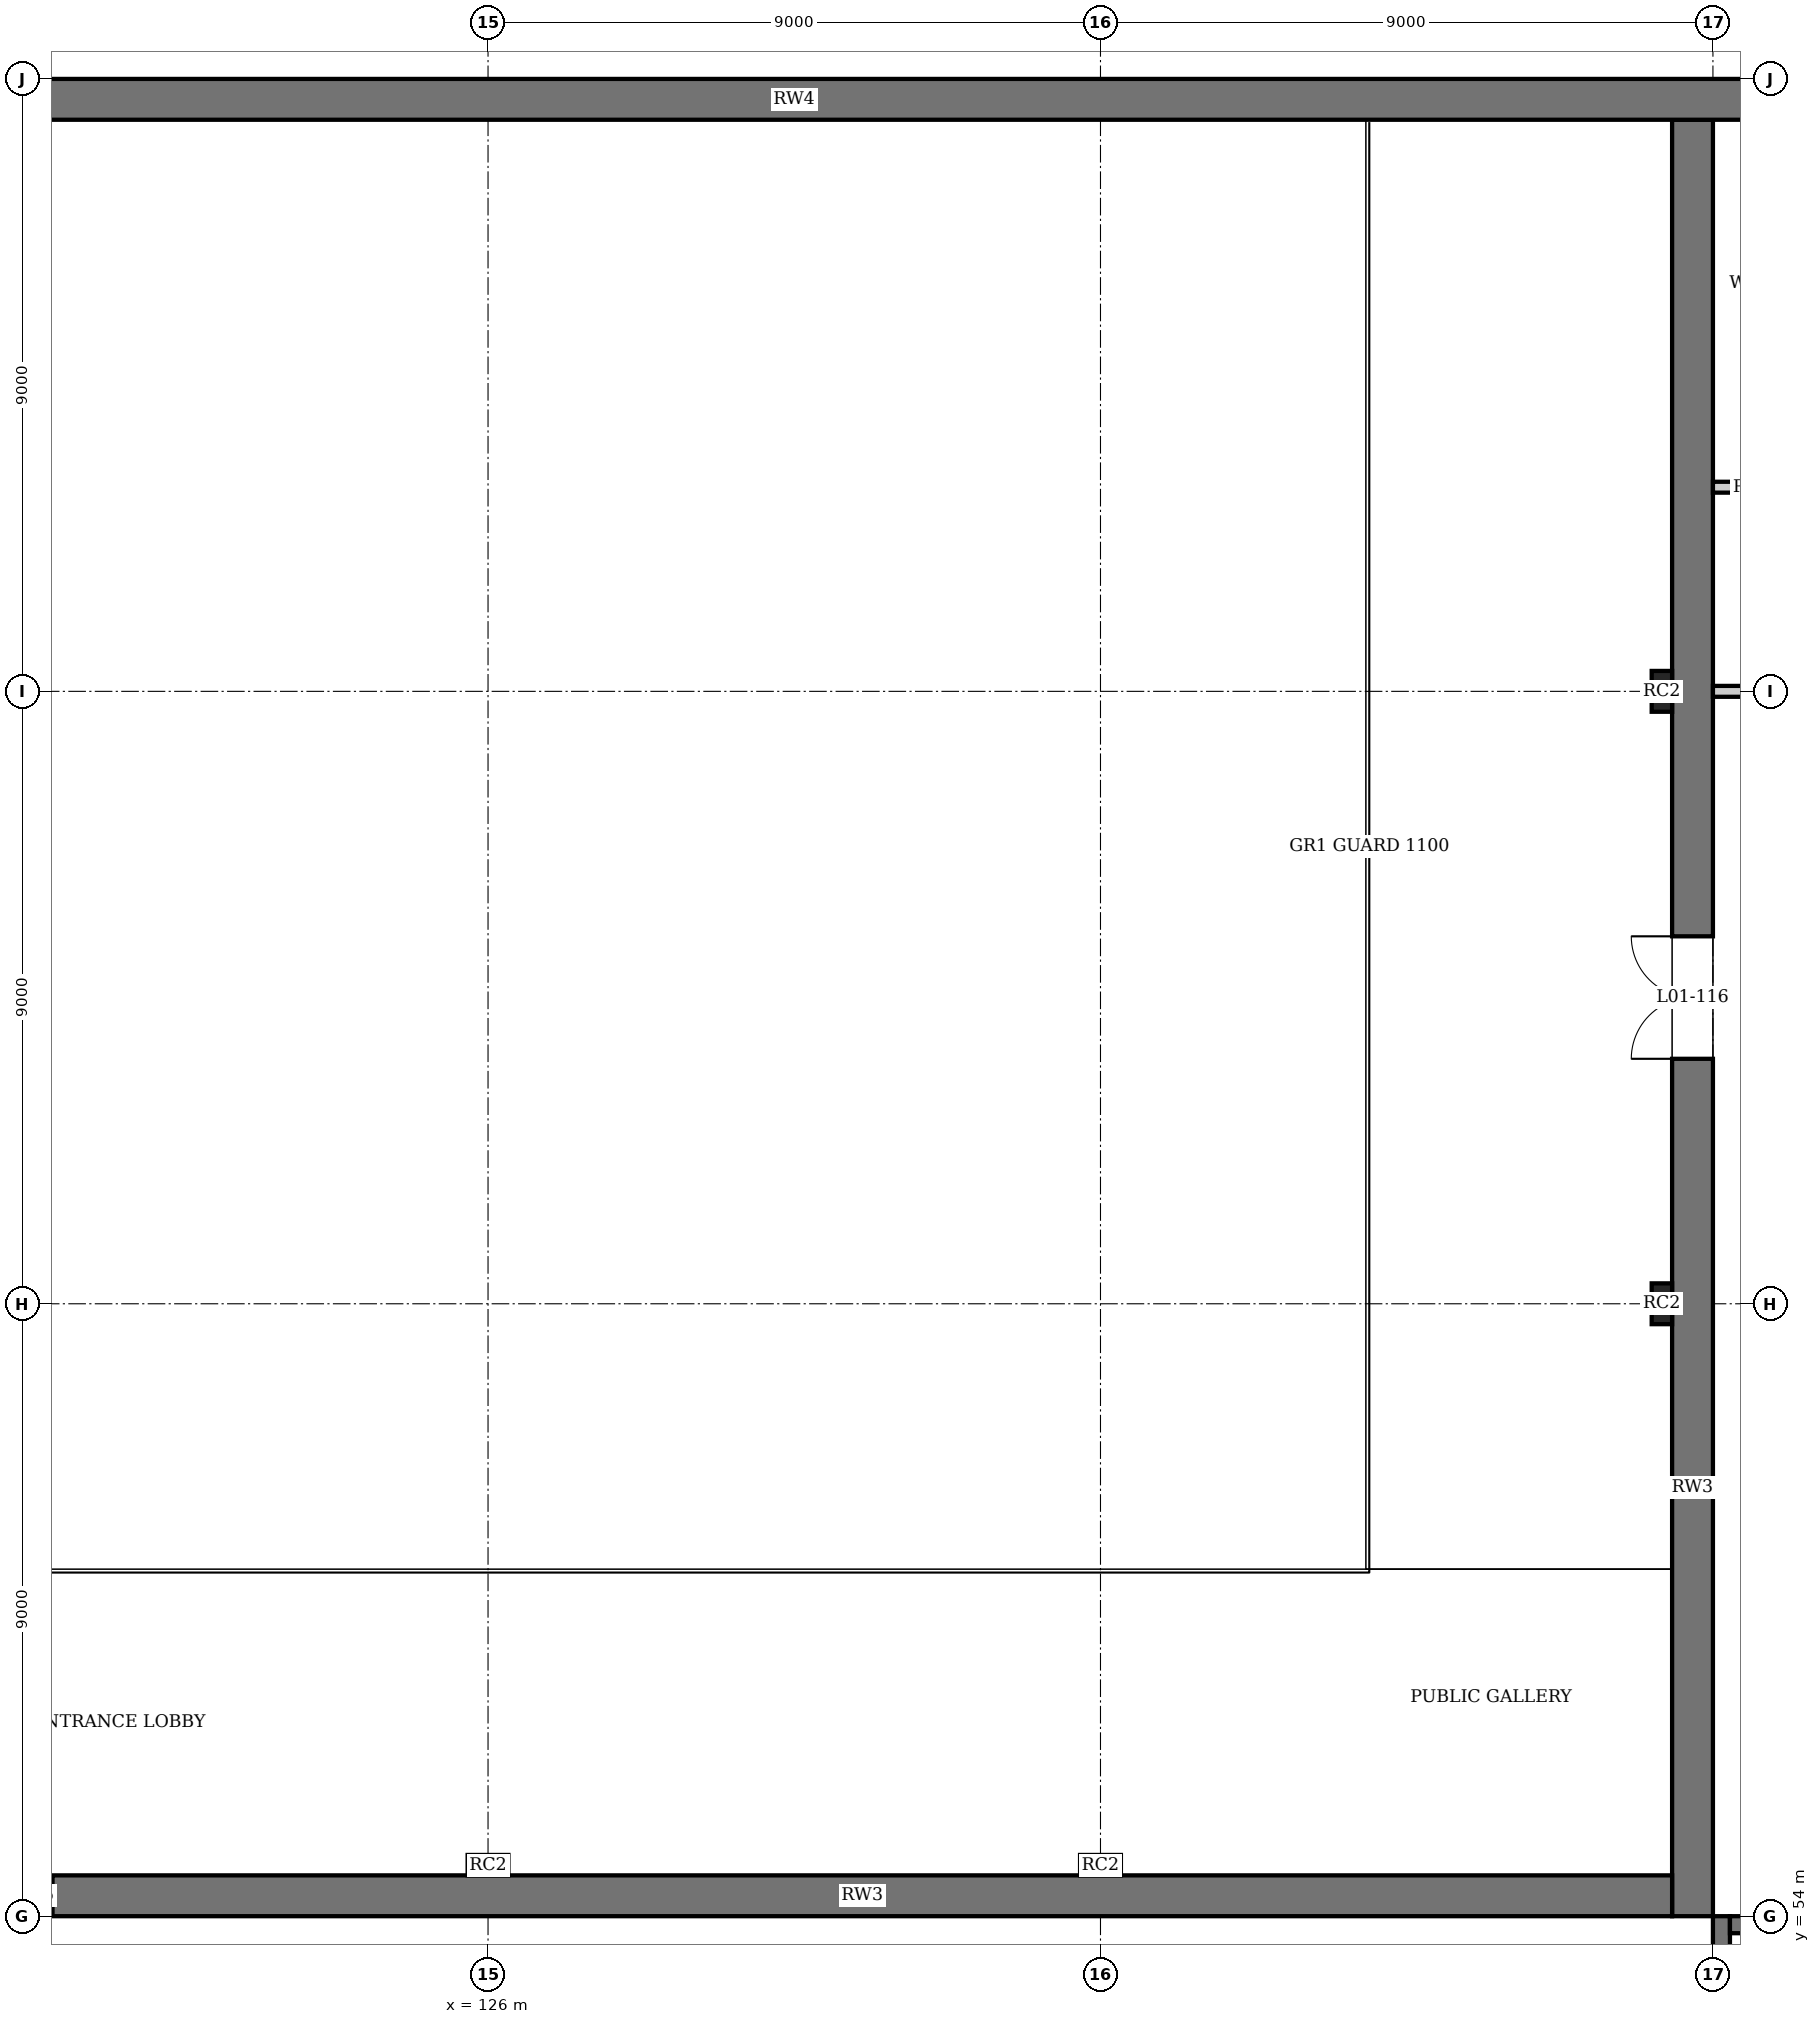
"""IFC4 building model, lengths in metres.
Left out: names, types, materials, properties, quantities, classifications, styles, units other than length and angle.
Written with IfcOpenShell. Run it as: python <this file> out.ifc"""

import sys

from ifc_helpers import new_model, si_unit, direction, frame, frame_2d, origin, origin_2d, place, context, subcontext, project, spatial, rectangle, extrude, element, fill, save


model = new_model("IFC4")
c1 = context("Model", 3, precision=1e-05, world=origin(), true_north=direction((0.0, 1.0)))
c2 = subcontext(c1, "Body", "Model", "MODEL_VIEW")
j1 = project(units=[si_unit("LENGTHUNIT", "METRE"), si_unit("PLANEANGLEUNIT", "RADIAN")], contexts=[c1])
p1 = place(None, origin())
s1 = spatial("IfcSite", under=j1, at=p1, CompositionType="ELEMENT")
p2 = place(p1, origin())
s2 = spatial("IfcBuilding", under=s1, at=p2, CompositionType="ELEMENT")
p3 = place(p2, frame((0.0, 0.0, 6.0)))
s3 = spatial("IfcBuildingStorey", under=s2, at=p3, CompositionType="ELEMENT", Elevation=6.0)
p4 = place(p3, frame((144.125, 45.0, 0.0), z_axis=(0.0, 0.0, 1.0), x_axis=(0.0, 1.0, 0.0)))
e1 = element("IfcWall", 1, at=p4, inside=s3, PredefinedType="SHEAR", context=c2, shape_type="SweptSolid", body=[
    extrude(rectangle(XDim=9.0, YDim=0.25, at=frame_2d((4.5, 0.0))), origin(), (0.0, 0.0, 1.0), 4.5),
])
p5 = place(p3, frame((144.25, 53.875, 0.0), z_axis=(0.0, 0.0, 1.0), x_axis=(1.0, 0.0, 0.0)))
e2 = element("IfcWall", 2, at=p5, inside=s3, PredefinedType="SHEAR", context=c2, shape_type="SweptSolid", body=[
    extrude(rectangle(XDim=8.5, YDim=0.25, at=frame_2d((4.25, 0.0))), origin(), (0.0, 0.0, 1.0), 4.5),
])
p6 = place(p5, frame((6.95, 0.0, 0.0)))
e3 = element("IfcOpeningElement", 3, at=p6, cuts=e2, PredefinedType="OPENING", context=c2, shape_type="SweptSolid", body=[
    extrude(rectangle(XDim=1.0, YDim=2.1, at=frame_2d((0.5, 1.05))), frame((0.0, 0.135, 0.0), z_axis=(0.0, -1.0, 0.0), x_axis=(1.0, 0.0, 0.0)), (0.0, 0.0, 1.0), 0.27),
])
p7 = place(p3, frame((143.7, 54.0, 0.0), z_axis=(0.0, 0.0, 1.0), x_axis=(0.0, 1.0, 0.0)))
e4 = element("IfcWall", 4, at=p7, inside=s3, PredefinedType="SHEAR", context=c2, shape_type="SweptSolid", body=[
    extrude(rectangle(XDim=26.4, YDim=0.6, at=frame_2d((13.2, 0.0))), origin(), (0.0, 0.0, 1.0), 4.5),
])
p8 = place(p7, frame((12.6, 0.0, 0.0)))
e5 = element("IfcOpeningElement", 5, at=p8, cuts=e4, PredefinedType="OPENING", context=c2, shape_type="SweptSolid", body=[
    extrude(rectangle(XDim=1.8, YDim=2.1, at=frame_2d((0.9, 1.05))), frame((0.0, 0.31, 0.0), z_axis=(0.0, -1.0, 0.0), x_axis=(1.0, 0.0, 0.0)), (0.0, 0.0, 1.0), 0.62),
])
p9 = place(p3, frame((117.6, 54.3, 0.0), z_axis=(0.0, 0.0, 1.0), x_axis=(1.0, 0.0, 0.0)))
e6 = element("IfcWall", 6, at=p9, inside=s3, PredefinedType="SHEAR", context=c2, shape_type="SweptSolid", body=[
    extrude(rectangle(XDim=25.8, YDim=0.6, at=frame_2d((12.9, 0.0))), origin(), (0.0, 0.0, 1.0), 4.5),
])
p10 = place(p9, frame((1.0, 0.0, 0.0)))
e7 = element("IfcOpeningElement", 7, at=p10, cuts=e6, PredefinedType="OPENING", context=c2, shape_type="SweptSolid", body=[
    extrude(rectangle(XDim=1.0, YDim=2.1, at=frame_2d((0.5, 1.05))), frame((0.0, 0.31, 0.0), z_axis=(0.0, -1.0, 0.0), x_axis=(1.0, 0.0, 0.0)), (0.0, 0.0, 1.0), 0.62),
])
for number, where, z_axis, x_axis in (
    (8, (126.0, 54.75, 0.0), (0.0, 0.0, 1.0), (1.0, 0.0, 0.0)),
    (9, (135.0, 54.75, 0.0), (0.0, 0.0, 1.0), (1.0, 0.0, 0.0)),
    (10, (143.25, 63.0, 0.0), (0.0, 0.0, 1.0), (0.0, 1.0, 0.0)),
    (11, (143.25, 72.0, 0.0), (0.0, 0.0, 1.0), (0.0, 1.0, 0.0)),
):
    element("IfcColumn", number, at=place(p3, frame(where, z_axis=z_axis, x_axis=x_axis)), inside=s3, PredefinedType="PILASTER", context=c2, shape_type="SweptSolid", body=[
        extrude(rectangle(XDim=0.6, YDim=0.3, at=origin_2d()), origin(), (0.0, 0.0, 1.0), 4.5),
    ])
p11 = place(p3, frame((0.0, 80.7, 0.0), z_axis=(0.0, 0.0, 1.0), x_axis=(1.0, 0.0, 0.0)))
e12 = element("IfcWall", 12, at=p11, inside=s3, PredefinedType="SHEAR", context=c2, shape_type="SweptSolid", body=[
    extrude(rectangle(XDim=180.0, YDim=0.6, at=frame_2d((90.0, 0.0))), origin(), (0.0, 0.0, 1.0), 4.5),
])
p12 = place(p11, frame((0.9, 0.0, 0.6)))
e13 = element("IfcOpeningElement", 13, at=p12, cuts=e12, PredefinedType="OPENING", context=c2, shape_type="SweptSolid", body=[
    extrude(rectangle(XDim=2.7, YDim=2.7, at=frame_2d((1.35, 1.35))), frame((0.0, 0.31, 0.0), z_axis=(0.0, -1.0, 0.0), x_axis=(1.0, 0.0, 0.0)), (0.0, 0.0, 1.0), 0.62),
])
p13 = place(p11, frame((5.4, 0.0, 0.6)))
e14 = element("IfcOpeningElement", 14, at=p13, cuts=e12, PredefinedType="OPENING", context=c2, shape_type="SweptSolid", body=[
    extrude(rectangle(XDim=2.7, YDim=2.7, at=frame_2d((1.35, 1.35))), frame((0.0, 0.31, 0.0), z_axis=(0.0, -1.0, 0.0), x_axis=(1.0, 0.0, 0.0)), (0.0, 0.0, 1.0), 0.62),
])
p14 = place(p11, frame((9.9, 0.0, 0.6)))
e15 = element("IfcOpeningElement", 15, at=p14, cuts=e12, PredefinedType="OPENING", context=c2, shape_type="SweptSolid", body=[
    extrude(rectangle(XDim=2.7, YDim=2.7, at=frame_2d((1.35, 1.35))), frame((0.0, 0.31, 0.0), z_axis=(0.0, -1.0, 0.0), x_axis=(1.0, 0.0, 0.0)), (0.0, 0.0, 1.0), 0.62),
])
p15 = place(p11, frame((14.4, 0.0, 0.6)))
e16 = element("IfcOpeningElement", 16, at=p15, cuts=e12, PredefinedType="OPENING", context=c2, shape_type="SweptSolid", body=[
    extrude(rectangle(XDim=2.7, YDim=2.7, at=frame_2d((1.35, 1.35))), frame((0.0, 0.31, 0.0), z_axis=(0.0, -1.0, 0.0), x_axis=(1.0, 0.0, 0.0)), (0.0, 0.0, 1.0), 0.62),
])
p16 = place(p11, frame((18.9, 0.0, 0.6)))
e17 = element("IfcOpeningElement", 17, at=p16, cuts=e12, PredefinedType="OPENING", context=c2, shape_type="SweptSolid", body=[
    extrude(rectangle(XDim=2.7, YDim=2.7, at=frame_2d((1.35, 1.35))), frame((0.0, 0.31, 0.0), z_axis=(0.0, -1.0, 0.0), x_axis=(1.0, 0.0, 0.0)), (0.0, 0.0, 1.0), 0.62),
])
p17 = place(p11, frame((23.4, 0.0, 0.6)))
e18 = element("IfcOpeningElement", 18, at=p17, cuts=e12, PredefinedType="OPENING", context=c2, shape_type="SweptSolid", body=[
    extrude(rectangle(XDim=2.7, YDim=2.7, at=frame_2d((1.35, 1.35))), frame((0.0, 0.31, 0.0), z_axis=(0.0, -1.0, 0.0), x_axis=(1.0, 0.0, 0.0)), (0.0, 0.0, 1.0), 0.62),
])
p18 = place(p11, frame((37.05, 0.0, 0.9)))
e19 = element("IfcOpeningElement", 19, at=p18, cuts=e12, PredefinedType="OPENING", context=c2, shape_type="SweptSolid", body=[
    extrude(rectangle(XDim=2.4, YDim=2.1, at=frame_2d((1.2, 1.05))), frame((0.0, 0.31, 0.0), z_axis=(0.0, -1.0, 0.0), x_axis=(1.0, 0.0, 0.0)), (0.0, 0.0, 1.0), 0.62),
])
p19 = place(p11, frame((41.55, 0.0, 0.9)))
e20 = element("IfcOpeningElement", 20, at=p19, cuts=e12, PredefinedType="OPENING", context=c2, shape_type="SweptSolid", body=[
    extrude(rectangle(XDim=2.4, YDim=2.1, at=frame_2d((1.2, 1.05))), frame((0.0, 0.31, 0.0), z_axis=(0.0, -1.0, 0.0), x_axis=(1.0, 0.0, 0.0)), (0.0, 0.0, 1.0), 0.62),
])
p20 = place(p11, frame((46.05, 0.0, 0.9)))
e21 = element("IfcOpeningElement", 21, at=p20, cuts=e12, PredefinedType="OPENING", context=c2, shape_type="SweptSolid", body=[
    extrude(rectangle(XDim=2.4, YDim=2.1, at=frame_2d((1.2, 1.05))), frame((0.0, 0.31, 0.0), z_axis=(0.0, -1.0, 0.0), x_axis=(1.0, 0.0, 0.0)), (0.0, 0.0, 1.0), 0.62),
])
p21 = place(p11, frame((50.55, 0.0, 0.9)))
e22 = element("IfcOpeningElement", 22, at=p21, cuts=e12, PredefinedType="OPENING", context=c2, shape_type="SweptSolid", body=[
    extrude(rectangle(XDim=2.4, YDim=2.1, at=frame_2d((1.2, 1.05))), frame((0.0, 0.31, 0.0), z_axis=(0.0, -1.0, 0.0), x_axis=(1.0, 0.0, 0.0)), (0.0, 0.0, 1.0), 0.62),
])
p22 = place(p11, frame((55.05, 0.0, 0.9)))
e23 = element("IfcOpeningElement", 23, at=p22, cuts=e12, PredefinedType="OPENING", context=c2, shape_type="SweptSolid", body=[
    extrude(rectangle(XDim=2.4, YDim=2.1, at=frame_2d((1.2, 1.05))), frame((0.0, 0.31, 0.0), z_axis=(0.0, -1.0, 0.0), x_axis=(1.0, 0.0, 0.0)), (0.0, 0.0, 1.0), 0.62),
])
p23 = place(p11, frame((59.55, 0.0, 0.9)))
e24 = element("IfcOpeningElement", 24, at=p23, cuts=e12, PredefinedType="OPENING", context=c2, shape_type="SweptSolid", body=[
    extrude(rectangle(XDim=2.4, YDim=2.1, at=frame_2d((1.2, 1.05))), frame((0.0, 0.31, 0.0), z_axis=(0.0, -1.0, 0.0), x_axis=(1.0, 0.0, 0.0)), (0.0, 0.0, 1.0), 0.62),
])
p24 = place(p11, frame((64.8, 0.0, 1.7)))
e25 = element("IfcOpeningElement", 25, at=p24, cuts=e12, PredefinedType="OPENING", context=c2, shape_type="SweptSolid", body=[
    extrude(rectangle(XDim=0.9, YDim=0.6, at=frame_2d((0.45, 0.3))), frame((0.0, 0.31, 0.0), z_axis=(0.0, -1.0, 0.0), x_axis=(1.0, 0.0, 0.0)), (0.0, 0.0, 1.0), 0.62),
])
p25 = place(p11, frame((69.3, 0.0, 1.7)))
e26 = element("IfcOpeningElement", 26, at=p25, cuts=e12, PredefinedType="OPENING", context=c2, shape_type="SweptSolid", body=[
    extrude(rectangle(XDim=0.9, YDim=0.6, at=frame_2d((0.45, 0.3))), frame((0.0, 0.31, 0.0), z_axis=(0.0, -1.0, 0.0), x_axis=(1.0, 0.0, 0.0)), (0.0, 0.0, 1.0), 0.62),
])
p26 = place(p11, frame((73.8, 0.0, 1.7)))
e27 = element("IfcOpeningElement", 27, at=p26, cuts=e12, PredefinedType="OPENING", context=c2, shape_type="SweptSolid", body=[
    extrude(rectangle(XDim=0.9, YDim=0.6, at=frame_2d((0.45, 0.3))), frame((0.0, 0.31, 0.0), z_axis=(0.0, -1.0, 0.0), x_axis=(1.0, 0.0, 0.0)), (0.0, 0.0, 1.0), 0.62),
])
p27 = place(p11, frame((90.9, 0.0, 0.6)))
e28 = element("IfcOpeningElement", 28, at=p27, cuts=e12, PredefinedType="OPENING", context=c2, shape_type="SweptSolid", body=[
    extrude(rectangle(XDim=2.7, YDim=2.7, at=frame_2d((1.35, 1.35))), frame((0.0, 0.31, 0.0), z_axis=(0.0, -1.0, 0.0), x_axis=(1.0, 0.0, 0.0)), (0.0, 0.0, 1.0), 0.62),
])
p28 = place(p11, frame((95.4, 0.0, 0.6)))
e29 = element("IfcOpeningElement", 29, at=p28, cuts=e12, PredefinedType="OPENING", context=c2, shape_type="SweptSolid", body=[
    extrude(rectangle(XDim=2.7, YDim=2.7, at=frame_2d((1.35, 1.35))), frame((0.0, 0.31, 0.0), z_axis=(0.0, -1.0, 0.0), x_axis=(1.0, 0.0, 0.0)), (0.0, 0.0, 1.0), 0.62),
])
p29 = place(p11, frame((100.8, 0.0, 1.7)))
e30 = element("IfcOpeningElement", 30, at=p29, cuts=e12, PredefinedType="OPENING", context=c2, shape_type="SweptSolid", body=[
    extrude(rectangle(XDim=0.9, YDim=0.6, at=frame_2d((0.45, 0.3))), frame((0.0, 0.31, 0.0), z_axis=(0.0, -1.0, 0.0), x_axis=(1.0, 0.0, 0.0)), (0.0, 0.0, 1.0), 0.62),
])
p30 = place(p11, frame((105.3, 0.0, 1.7)))
e31 = element("IfcOpeningElement", 31, at=p30, cuts=e12, PredefinedType="OPENING", context=c2, shape_type="SweptSolid", body=[
    extrude(rectangle(XDim=0.9, YDim=0.6, at=frame_2d((0.45, 0.3))), frame((0.0, 0.31, 0.0), z_axis=(0.0, -1.0, 0.0), x_axis=(1.0, 0.0, 0.0)), (0.0, 0.0, 1.0), 0.62),
])
p31 = place(p11, frame((109.8, 0.0, 1.7)))
e32 = element("IfcOpeningElement", 32, at=p31, cuts=e12, PredefinedType="OPENING", context=c2, shape_type="SweptSolid", body=[
    extrude(rectangle(XDim=0.9, YDim=0.6, at=frame_2d((0.45, 0.3))), frame((0.0, 0.31, 0.0), z_axis=(0.0, -1.0, 0.0), x_axis=(1.0, 0.0, 0.0)), (0.0, 0.0, 1.0), 0.62),
])
p32 = place(p11, frame((154.05, 0.0, 0.9)))
e33 = element("IfcOpeningElement", 33, at=p32, cuts=e12, PredefinedType="OPENING", context=c2, shape_type="SweptSolid", body=[
    extrude(rectangle(XDim=2.4, YDim=2.1, at=frame_2d((1.2, 1.05))), frame((0.0, 0.31, 0.0), z_axis=(0.0, -1.0, 0.0), x_axis=(1.0, 0.0, 0.0)), (0.0, 0.0, 1.0), 0.62),
])
p33 = place(p11, frame((158.55, 0.0, 0.9)))
e34 = element("IfcOpeningElement", 34, at=p33, cuts=e12, PredefinedType="OPENING", context=c2, shape_type="SweptSolid", body=[
    extrude(rectangle(XDim=2.4, YDim=2.1, at=frame_2d((1.2, 1.05))), frame((0.0, 0.31, 0.0), z_axis=(0.0, -1.0, 0.0), x_axis=(1.0, 0.0, 0.0)), (0.0, 0.0, 1.0), 0.62),
])
p34 = place(p11, frame((163.8, 0.0, 1.7)))
e35 = element("IfcOpeningElement", 35, at=p34, cuts=e12, PredefinedType="OPENING", context=c2, shape_type="SweptSolid", body=[
    extrude(rectangle(XDim=0.9, YDim=0.6, at=frame_2d((0.45, 0.3))), frame((0.0, 0.31, 0.0), z_axis=(0.0, -1.0, 0.0), x_axis=(1.0, 0.0, 0.0)), (0.0, 0.0, 1.0), 0.62),
])
p35 = place(p11, frame((168.3, 0.0, 1.7)))
e36 = element("IfcOpeningElement", 36, at=p35, cuts=e12, PredefinedType="OPENING", context=c2, shape_type="SweptSolid", body=[
    extrude(rectangle(XDim=0.9, YDim=0.6, at=frame_2d((0.45, 0.3))), frame((0.0, 0.31, 0.0), z_axis=(0.0, -1.0, 0.0), x_axis=(1.0, 0.0, 0.0)), (0.0, 0.0, 1.0), 0.62),
])
p36 = place(p11, frame((71.55, 0.0, 1.7)))
e37 = element("IfcOpeningElement", 37, at=p36, cuts=e12, PredefinedType="OPENING", context=c2, shape_type="SweptSolid", body=[
    extrude(rectangle(XDim=0.9, YDim=0.6, at=frame_2d((0.45, 0.3))), frame((0.0, 0.31, 0.0), z_axis=(0.0, -1.0, 0.0), x_axis=(1.0, 0.0, 0.0)), (0.0, 0.0, 1.0), 0.62),
])
p37 = place(p11, frame((76.3, 0.0, 1.7)))
e38 = element("IfcOpeningElement", 38, at=p37, cuts=e12, PredefinedType="OPENING", context=c2, shape_type="SweptSolid", body=[
    extrude(rectangle(XDim=0.9, YDim=0.6, at=frame_2d((0.45, 0.3))), frame((0.0, 0.31, 0.0), z_axis=(0.0, -1.0, 0.0), x_axis=(1.0, 0.0, 0.0)), (0.0, 0.0, 1.0), 0.62),
])
p38 = place(p11, frame((107.55, 0.0, 1.7)))
e39 = element("IfcOpeningElement", 39, at=p38, cuts=e12, PredefinedType="OPENING", context=c2, shape_type="SweptSolid", body=[
    extrude(rectangle(XDim=0.9, YDim=0.6, at=frame_2d((0.45, 0.3))), frame((0.0, 0.31, 0.0), z_axis=(0.0, -1.0, 0.0), x_axis=(1.0, 0.0, 0.0)), (0.0, 0.0, 1.0), 0.62),
])
p39 = place(p11, frame((112.3, 0.0, 1.7)))
e40 = element("IfcOpeningElement", 40, at=p39, cuts=e12, PredefinedType="OPENING", context=c2, shape_type="SweptSolid", body=[
    extrude(rectangle(XDim=0.9, YDim=0.6, at=frame_2d((0.45, 0.3))), frame((0.0, 0.31, 0.0), z_axis=(0.0, -1.0, 0.0), x_axis=(1.0, 0.0, 0.0)), (0.0, 0.0, 1.0), 0.62),
])
p40 = place(p11, frame((166.05, 0.0, 1.7)))
e41 = element("IfcOpeningElement", 41, at=p40, cuts=e12, PredefinedType="OPENING", context=c2, shape_type="SweptSolid", body=[
    extrude(rectangle(XDim=0.9, YDim=0.6, at=frame_2d((0.45, 0.3))), frame((0.0, 0.31, 0.0), z_axis=(0.0, -1.0, 0.0), x_axis=(1.0, 0.0, 0.0)), (0.0, 0.0, 1.0), 0.62),
])
p41 = place(p3, frame((144.0, 72.0, 0.0), z_axis=(0.0, 0.0, 1.0), x_axis=(1.0, 0.0, 0.0)))
e42 = element("IfcWall", 42, at=p41, inside=s3, PredefinedType="PARTITIONING", context=c2, shape_type="SweptSolid", body=[
    extrude(rectangle(XDim=8.843, YDim=0.16, at=frame_2d((4.421, 0.0))), origin(), (0.0, 0.0, 1.0), 3.822),
])
p42 = place(p41, frame((4.1, 0.0, 0.0)))
e43 = element("IfcOpeningElement", 43, at=p42, cuts=e42, PredefinedType="OPENING", context=c2, shape_type="SweptSolid", body=[
    extrude(rectangle(XDim=1.0, YDim=2.1, at=frame_2d((0.5, 1.05))), frame((0.0, 0.09, 0.0), z_axis=(0.0, -1.0, 0.0), x_axis=(1.0, 0.0, 0.0)), (0.0, 0.0, 1.0), 0.18),
])
p43 = place(p3, frame((144.0, 75.0, 0.0), z_axis=(0.0, 0.0, 1.0), x_axis=(1.0, 0.0, 0.0)))
e44 = element("IfcWall", 44, at=p43, inside=s3, PredefinedType="PARTITIONING", context=c2, shape_type="SweptSolid", body=[
    extrude(rectangle(XDim=2.89, YDim=0.16, at=frame_2d((1.445, 0.0))), origin(), (0.0, 0.0, 1.0), 4.35),
])
p44 = place(p43, frame((1.1, 0.0, 0.0)))
e45 = element("IfcOpeningElement", 45, at=p44, cuts=e44, PredefinedType="OPENING", context=c2, shape_type="SweptSolid", body=[
    extrude(rectangle(XDim=1.0, YDim=2.1, at=frame_2d((0.5, 1.05))), frame((0.0, 0.09, 0.0), z_axis=(0.0, -1.0, 0.0), x_axis=(1.0, 0.0, 0.0)), (0.0, 0.0, 1.0), 0.18),
])
p45 = place(p8, origin())
e46 = element("IfcDoor", 46, at=p45, inside=s3, OperationType="DOUBLE_DOOR_SINGLE_SWING", PredefinedType="DOOR", context=c2, shape_type="SweptSolid", body=[
    extrude(rectangle(XDim=1.8, YDim=2.1, at=frame_2d((0.9, 1.05))), frame((0.0, 0.025, 0.0), z_axis=(0.0, -1.0, 0.0), x_axis=(1.0, 0.0, 0.0)), (0.0, 0.0, 1.0), 0.05),
])
fill(e5, e46)
save(model, sys.argv[1])
